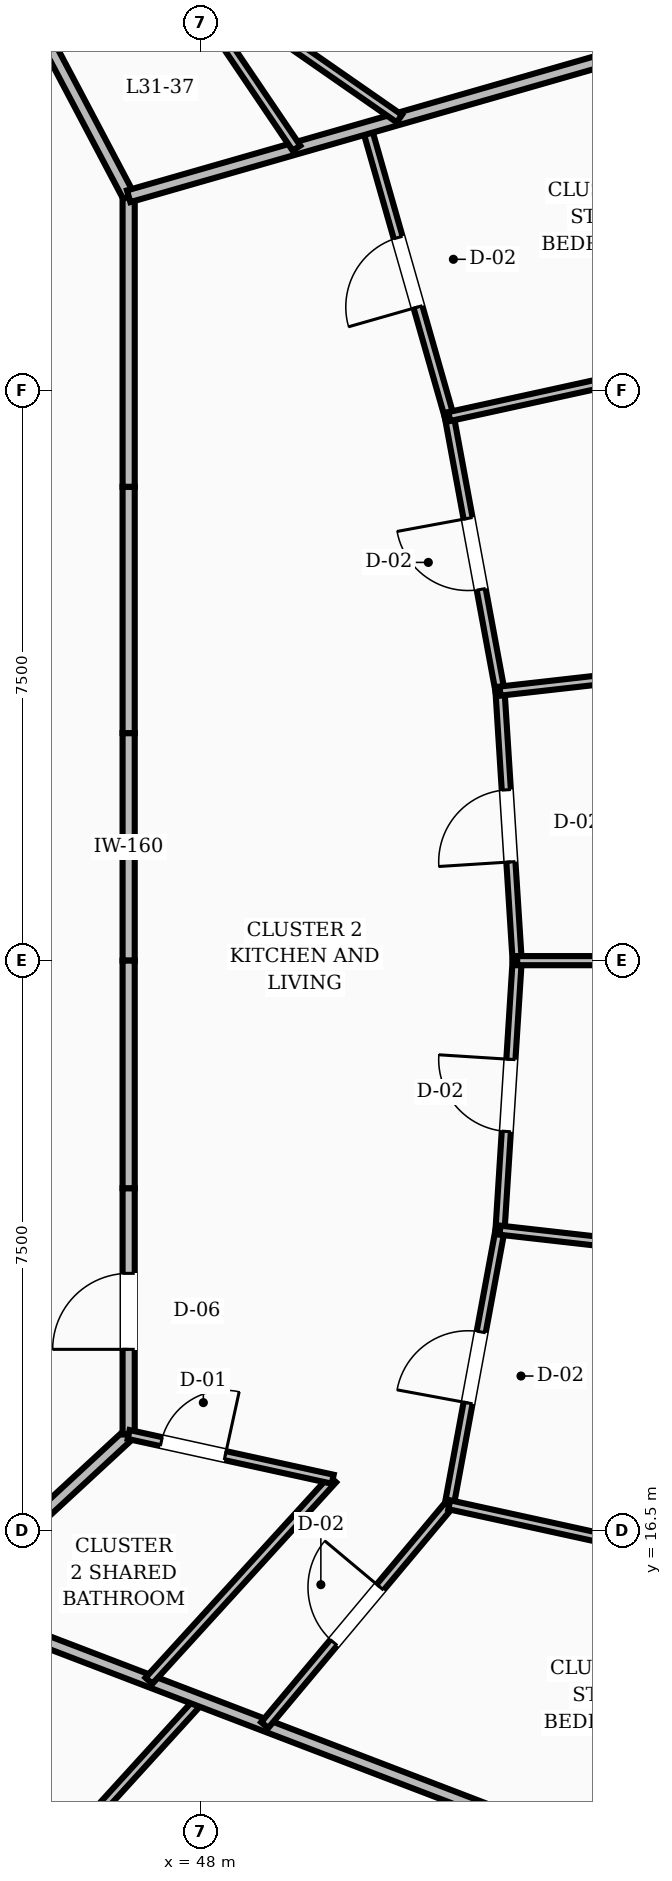
"""IFC4 building model, lengths in metres.
Left out: names, types, materials, properties, quantities, classifications, styles, units other than length and angle.
Written with IfcOpenShell. Run it as: python <this file> out.ifc"""

import sys

from ifc_helpers import new_model, si_unit, direction, frame, frame_2d, origin, place, context, subcontext, project, spatial, rectangle, extrude, element, fill, save


model = new_model("IFC4")
c1 = context("Model", 3, precision=1e-05, world=origin(), true_north=direction((0.0, 1.0)))
c2 = subcontext(c1, "Body", "Model", "MODEL_VIEW")
j1 = project(units=[si_unit("LENGTHUNIT", "METRE"), si_unit("PLANEANGLEUNIT", "RADIAN")], contexts=[c1])
p1 = place(None, origin())
s1 = spatial("IfcSite", under=j1, at=p1, CompositionType="ELEMENT")
p2 = place(p1, origin())
s2 = spatial("IfcBuilding", under=s1, at=p2, CompositionType="ELEMENT")
p3 = place(p2, frame((0.0, 0.0, 124.4)))
s3 = spatial("IfcBuildingStorey", under=s2, at=p3, CompositionType="ELEMENT", Elevation=124.4)
p4 = place(p3, frame((47.05, 24.0, 0.0), z_axis=(0.0, 0.0, 1.0), x_axis=(0.0, 1.0, 0.0)))
e1 = element("IfcWall", 1, at=p4, inside=s3, PredefinedType="SOLIDWALL", context=c2, shape_type="SweptSolid", body=[
    extrude(rectangle(XDim=2.994, YDim=0.16, at=frame_2d((1.497, 0.0))), origin(), (0.0, 0.0, 1.0), 2.8),
])
p5 = place(p3, frame((47.05, 26.994, 0.0), z_axis=(0.0, 0.0, 1.0), x_axis=(0.0, 1.0, 0.0)))
e2 = element("IfcWall", 2, at=p5, inside=s3, PredefinedType="SOLIDWALL", context=c2, shape_type="SweptSolid", body=[
    extrude(rectangle(XDim=3.24, YDim=0.16, at=frame_2d((1.62, 0.0))), origin(), (0.0, 0.0, 1.0), 2.8),
])
p6 = place(p3, frame((47.05, 30.234, 0.0), z_axis=(0.0, 0.0, 1.0), x_axis=(0.0, 1.0, 0.0)))
e3 = element("IfcWall", 3, at=p6, inside=s3, PredefinedType="SOLIDWALL", context=c2, shape_type="SweptSolid", body=[
    extrude(rectangle(XDim=3.822, YDim=0.16, at=frame_2d((1.911, 0.0))), origin(), (0.0, 0.0, 1.0), 2.8),
])
p7 = place(p3, frame((47.05, 34.056, 0.0), z_axis=(0.0, 0.0, 1.0), x_axis=(-0.466737093093, 0.884396113702, 0.0)))
e4 = element("IfcWall", 4, at=p7, inside=s3, PredefinedType="SOLIDWALL", context=c2, shape_type="SweptSolid", body=[
    extrude(rectangle(XDim=3.696, YDim=0.16, at=frame_2d((1.848, 0.0))), origin(), (0.0, 0.0, 1.0), 2.8),
])
p8 = place(p3, frame((44.65, 15.548, 0.0), z_axis=(0.0, 0.0, 1.0), x_axis=(0.734347936521, 0.678773237633, 0.0)))
e5 = element("IfcWall", 5, at=p8, inside=s3, PredefinedType="SOLIDWALL", context=c2, shape_type="SweptSolid", body=[
    extrude(rectangle(XDim=3.268, YDim=0.16, at=frame_2d((1.634, 0.0))), origin(), (0.0, 0.0, 1.0), 2.8),
])
p9 = place(p3, frame((47.05, 17.766, 0.0), z_axis=(0.0, 0.0, 1.0), x_axis=(0.0, 1.0, 0.0)))
e6 = element("IfcWall", 6, at=p9, inside=s3, PredefinedType="SOLIDWALL", context=c2, shape_type="SweptSolid", body=[
    extrude(rectangle(XDim=3.24, YDim=0.16, at=frame_2d((1.62, 0.0))), origin(), (0.0, 0.0, 1.0), 2.8),
])
p10 = place(p9, frame((1.12, 0.0, 0.0)))
e7 = element("IfcOpeningElement", 7, at=p10, cuts=e6, PredefinedType="OPENING", context=c2, shape_type="SweptSolid", body=[
    extrude(rectangle(XDim=1.0, YDim=2.1, at=frame_2d((0.5, 1.05))), frame((0.0, 0.09, 0.0), z_axis=(0.0, -1.0, 0.0), x_axis=(1.0, 0.0, 0.0)), (0.0, 0.0, 1.0), 0.18),
])
p11 = place(p3, frame((47.05, 21.006, 0.0), z_axis=(0.0, 0.0, 1.0), x_axis=(0.0, 1.0, 0.0)))
e8 = element("IfcWall", 8, at=p11, inside=s3, PredefinedType="SOLIDWALL", context=c2, shape_type="SweptSolid", body=[
    extrude(rectangle(XDim=2.994, YDim=0.16, at=frame_2d((1.497, 0.0))), origin(), (0.0, 0.0, 1.0), 2.8),
])
p12 = place(p3, frame((45.579, 11.631, 0.0), z_axis=(0.0, 0.0, 1.0), x_axis=(0.673346353961, 0.739327185762, 0.0)))
e9 = element("IfcWall", 9, at=p12, inside=s3, PredefinedType="PARTITIONING", context=c2, shape_type="SweptSolid", body=[
    extrude(rectangle(XDim=3.571, YDim=0.12, at=frame_2d((1.785, 0.0))), origin(), (0.0, 0.0, 1.0), 2.8),
])
p13 = place(p3, frame((44.65, 15.548, 0.0), z_axis=(0.0, 0.0, 1.0), x_axis=(0.933853161124, -0.35765664185, 0.0)))
e10 = element("IfcWall", 10, at=p13, inside=s3, PredefinedType="SOLIDWALL", context=c2, shape_type="SweptSolid", body=[
    extrude(rectangle(XDim=10.147, YDim=0.16, at=frame_2d((5.073, 0.0))), origin(), (0.0, 0.0, 1.0), 2.8),
])
p14 = place(p3, frame((47.316, 14.526, 0.0), z_axis=(0.0, 0.0, 1.0), x_axis=(0.673803025367, 0.738911011562, 0.0)))
e11 = element("IfcWall", 11, at=p14, inside=s3, PredefinedType="PARTITIONING", context=c2, shape_type="SweptSolid", body=[
    extrude(rectangle(XDim=3.589, YDim=0.12, at=frame_2d((1.794, 0.0))), origin(), (0.0, 0.0, 1.0), 2.8),
])
p15 = place(p3, frame((47.05, 17.766, 0.0), z_axis=(0.0, 0.0, 1.0), x_axis=(0.976828673368, -0.214022762541, 0.0)))
e12 = element("IfcWall", 12, at=p15, inside=s3, PredefinedType="PARTITIONING", context=c2, shape_type="SweptSolid", body=[
    extrude(rectangle(XDim=2.748, YDim=0.12, at=frame_2d((1.374, 0.0))), origin(), (0.0, 0.0, 1.0), 2.8),
])
p16 = place(p15, frame((0.44, 0.0, 0.0)))
e13 = element("IfcOpeningElement", 13, at=p16, cuts=e12, PredefinedType="OPENING", context=c2, shape_type="SweptSolid", body=[
    extrude(rectangle(XDim=0.86, YDim=2.1, at=frame_2d((0.43, 1.05))), frame((0.0, 0.07, 0.0), z_axis=(0.0, -1.0, 0.0), x_axis=(1.0, 0.0, 0.0)), (0.0, 0.0, 1.0), 0.14),
])
p17 = place(p3, frame((48.84, 13.943, 0.0), z_axis=(0.0, 0.0, 1.0), x_axis=(0.64212553746, 0.766599500483, 0.0)))
e14 = element("IfcWall", 14, at=p17, inside=s3, PredefinedType="PARTITIONING", context=c2, shape_type="SweptSolid", body=[
    extrude(rectangle(XDim=3.781, YDim=0.12, at=frame_2d((1.891, 0.0))), origin(), (0.0, 0.0, 1.0), 2.8),
])
p18 = place(p17, frame((1.416, 0.0, 0.0)))
e15 = element("IfcOpeningElement", 15, at=p18, cuts=e14, PredefinedType="OPENING", context=c2, shape_type="SweptSolid", body=[
    extrude(rectangle(XDim=0.95, YDim=2.1, at=frame_2d((0.475, 1.05))), frame((0.0, 0.07, 0.0), z_axis=(0.0, -1.0, 0.0), x_axis=(1.0, 0.0, 0.0)), (0.0, 0.0, 1.0), 0.14),
])
p19 = place(p3, frame((51.268, 16.842, 0.0), z_axis=(0.0, 0.0, 1.0), x_axis=(0.181767968599, 0.983341449137, 0.0)))
e16 = element("IfcWall", 16, at=p19, inside=s3, PredefinedType="PARTITIONING", context=c2, shape_type="SweptSolid", body=[
    extrude(rectangle(XDim=3.674, YDim=0.12, at=frame_2d((1.837, 0.0))), origin(), (0.0, 0.0, 1.0), 2.8),
])
p20 = place(p19, frame((1.362, 0.0, 0.0)))
e17 = element("IfcOpeningElement", 17, at=p20, cuts=e16, PredefinedType="OPENING", context=c2, shape_type="SweptSolid", body=[
    extrude(rectangle(XDim=0.95, YDim=2.1, at=frame_2d((0.475, 1.05))), frame((0.0, 0.07, 0.0), z_axis=(0.0, -1.0, 0.0), x_axis=(1.0, 0.0, 0.0)), (0.0, 0.0, 1.0), 0.14),
])
p21 = place(p3, frame((51.268, 16.842, 0.0), z_axis=(0.0, 0.0, 1.0), x_axis=(0.976839732101, -0.213972282759, 0.0)))
e18 = element("IfcWall", 18, at=p21, inside=s3, PredefinedType="PARTITIONING", context=c2, shape_type="SweptSolid", body=[
    extrude(rectangle(XDim=5.446, YDim=0.12, at=frame_2d((2.723, 0.0))), origin(), (0.0, 0.0, 1.0), 2.8),
])
p22 = place(p3, frame((51.936, 20.454, 0.0), z_axis=(0.0, 0.0, 1.0), x_axis=(0.063490483218, 0.997982444004, 0.0)))
e19 = element("IfcWall", 19, at=p22, inside=s3, PredefinedType="PARTITIONING", context=c2, shape_type="SweptSolid", body=[
    extrude(rectangle(XDim=3.553, YDim=0.12, at=frame_2d((1.776, 0.0))), origin(), (0.0, 0.0, 1.0), 2.8),
])
p23 = place(p22, frame((1.302, 0.0, 0.0)))
e20 = element("IfcOpeningElement", 20, at=p23, cuts=e19, PredefinedType="OPENING", context=c2, shape_type="SweptSolid", body=[
    extrude(rectangle(XDim=0.95, YDim=2.1, at=frame_2d((0.475, 1.05))), frame((0.0, 0.07, 0.0), z_axis=(0.0, -1.0, 0.0), x_axis=(1.0, 0.0, 0.0)), (0.0, 0.0, 1.0), 0.14),
])
p24 = place(p3, frame((51.936, 20.454, 0.0), z_axis=(0.0, 0.0, 1.0), x_axis=(0.993672361239, -0.112317578806, 0.0)))
e21 = element("IfcWall", 21, at=p24, inside=s3, PredefinedType="PARTITIONING", context=c2, shape_type="SweptSolid", body=[
    extrude(rectangle(XDim=6.208, YDim=0.12, at=frame_2d((3.104, 0.0))), origin(), (0.0, 0.0, 1.0), 2.8),
])
p25 = place(p3, frame((52.161, 24.0, 0.0), z_axis=(0.0, 0.0, 1.0), x_axis=(-0.063490483218, 0.997982444004, 0.0)))
e22 = element("IfcWall", 22, at=p25, inside=s3, PredefinedType="PARTITIONING", context=c2, shape_type="SweptSolid", body=[
    extrude(rectangle(XDim=3.553, YDim=0.12, at=frame_2d((1.776, 0.0))), origin(), (0.0, 0.0, 1.0), 2.8),
])
p26 = place(p25, frame((1.302, 0.0, 0.0)))
e23 = element("IfcOpeningElement", 23, at=p26, cuts=e22, PredefinedType="OPENING", context=c2, shape_type="SweptSolid", body=[
    extrude(rectangle(XDim=0.95, YDim=2.1, at=frame_2d((0.475, 1.05))), frame((0.0, 0.07, 0.0), z_axis=(0.0, -1.0, 0.0), x_axis=(1.0, 0.0, 0.0)), (0.0, 0.0, 1.0), 0.14),
])
p27 = place(p3, frame((52.161, 24.0, 0.0), z_axis=(0.0, 0.0, 1.0), x_axis=(1.0, 0.0, 0.0)))
e24 = element("IfcWall", 24, at=p27, inside=s3, PredefinedType="PARTITIONING", context=c2, shape_type="SweptSolid", body=[
    extrude(rectangle(XDim=6.455, YDim=0.12, at=frame_2d((3.228, 0.0))), origin(), (0.0, 0.0, 1.0), 2.8),
])
p28 = place(p3, frame((51.936, 27.546, 0.0), z_axis=(0.0, 0.0, 1.0), x_axis=(-0.181767968599, 0.983341449137, 0.0)))
e25 = element("IfcWall", 25, at=p28, inside=s3, PredefinedType="PARTITIONING", context=c2, shape_type="SweptSolid", body=[
    extrude(rectangle(XDim=3.674, YDim=0.12, at=frame_2d((1.837, 0.0))), origin(), (0.0, 0.0, 1.0), 2.8),
])
p29 = place(p28, frame((1.362, 0.0, 0.0)))
e26 = element("IfcOpeningElement", 26, at=p29, cuts=e25, PredefinedType="OPENING", context=c2, shape_type="SweptSolid", body=[
    extrude(rectangle(XDim=0.95, YDim=2.1, at=frame_2d((0.475, 1.05))), frame((0.0, 0.07, 0.0), z_axis=(0.0, -1.0, 0.0), x_axis=(1.0, 0.0, 0.0)), (0.0, 0.0, 1.0), 0.14),
])
p30 = place(p3, frame((51.936, 27.546, 0.0), z_axis=(0.0, 0.0, 1.0), x_axis=(0.993672361239, 0.112317578806, 0.0)))
e27 = element("IfcWall", 27, at=p30, inside=s3, PredefinedType="PARTITIONING", context=c2, shape_type="SweptSolid", body=[
    extrude(rectangle(XDim=6.208, YDim=0.12, at=frame_2d((3.104, 0.0))), origin(), (0.0, 0.0, 1.0), 2.8),
])
p31 = place(p3, frame((51.268, 31.158, 0.0), z_axis=(0.0, 0.0, 1.0), x_axis=(-0.274582301576, 0.961563601465, 0.0)))
e28 = element("IfcWall", 28, at=p31, inside=s3, PredefinedType="PARTITIONING", context=c2, shape_type="SweptSolid", body=[
    extrude(rectangle(XDim=3.949, YDim=0.12, at=frame_2d((1.974, 0.0))), origin(), (0.0, 0.0, 1.0), 2.8),
])
p32 = place(p31, frame((1.5, 0.0, 0.0)))
e29 = element("IfcOpeningElement", 29, at=p32, cuts=e28, PredefinedType="OPENING", context=c2, shape_type="SweptSolid", body=[
    extrude(rectangle(XDim=0.95, YDim=2.1, at=frame_2d((0.475, 1.05))), frame((0.0, 0.07, 0.0), z_axis=(0.0, -1.0, 0.0), x_axis=(1.0, 0.0, 0.0)), (0.0, 0.0, 1.0), 0.14),
])
p33 = place(p3, frame((51.268, 31.158, 0.0), z_axis=(0.0, 0.0, 1.0), x_axis=(0.976839732101, 0.213972282759, 0.0)))
e30 = element("IfcWall", 30, at=p33, inside=s3, PredefinedType="PARTITIONING", context=c2, shape_type="SweptSolid", body=[
    extrude(rectangle(XDim=5.446, YDim=0.12, at=frame_2d((2.723, 0.0))), origin(), (0.0, 0.0, 1.0), 2.8),
])
p34 = place(p3, frame((47.05, 34.056, 0.0), z_axis=(0.0, 0.0, 1.0), x_axis=(0.96122671613, 0.275759315705, 0.0)))
e31 = element("IfcWall", 31, at=p34, inside=s3, PredefinedType="SOLIDWALL", context=c2, shape_type="SweptSolid", body=[
    extrude(rectangle(XDim=7.36, YDim=0.16, at=frame_2d((3.68, 0.0))), origin(), (0.0, 0.0, 1.0), 2.8),
])
p35 = place(p3, frame((49.258, 34.69, 0.0), z_axis=(0.0, 0.0, 1.0), x_axis=(-0.560422606551, 0.828206799095, 0.0)))
e32 = element("IfcWall", 32, at=p35, inside=s3, PredefinedType="PARTITIONING", context=c2, shape_type="SweptSolid", body=[
    extrude(rectangle(XDim=3.959, YDim=0.12, at=frame_2d((1.979, 0.0))), origin(), (0.0, 0.0, 1.0), 2.8),
])
p36 = place(p3, frame((50.611, 35.078, 0.0), z_axis=(0.0, 0.0, 1.0), x_axis=(-0.821081312211, 0.570811246156, 0.0)))
e33 = element("IfcWall", 33, at=p36, inside=s3, PredefinedType="PARTITIONING", context=c2, shape_type="SweptSolid", body=[
    extrude(rectangle(XDim=8.192, YDim=0.12, at=frame_2d((4.096, 0.0))), origin(), (0.0, 0.0, 1.0), 2.8),
])
p37 = place(p36, frame((5.021, 0.0, 0.0)))
e34 = element("IfcOpeningElement", 34, at=p37, cuts=e33, PredefinedType="OPENING", context=c2, shape_type="SweptSolid", body=[
    extrude(rectangle(XDim=0.95, YDim=2.1, at=frame_2d((0.475, 1.05))), frame((0.0, 0.07, 0.0), z_axis=(0.0, -1.0, 0.0), x_axis=(1.0, 0.0, 0.0)), (0.0, 0.0, 1.0), 0.14),
])
p38 = place(p16, origin())
e35 = element("IfcDoor", 35, at=p38, inside=s3, OperationType="SINGLE_SWING_RIGHT", PredefinedType="DOOR", context=c2, shape_type="SweptSolid", body=[
    extrude(rectangle(XDim=0.86, YDim=2.1, at=frame_2d((0.43, 1.05))), frame((0.0, 0.025, 0.0), z_axis=(0.0, -1.0, 0.0), x_axis=(1.0, 0.0, 0.0)), (0.0, 0.0, 1.0), 0.05),
])
fill(e13, e35)
p39 = place(p10, origin())
e36 = element("IfcDoor", 36, at=p39, inside=s3, OperationType="SINGLE_SWING_LEFT", PredefinedType="DOOR", context=c2, shape_type="SweptSolid", body=[
    extrude(rectangle(XDim=1.0, YDim=2.1, at=frame_2d((0.5, 1.05))), frame((0.0, 0.025, 0.0), z_axis=(0.0, -1.0, 0.0), x_axis=(1.0, 0.0, 0.0)), (0.0, 0.0, 1.0), 0.05),
])
fill(e7, e36)
p40 = place(p18, origin())
e37 = element("IfcDoor", 37, at=p40, inside=s3, OperationType="SINGLE_SWING_RIGHT", PredefinedType="DOOR", context=c2, shape_type="SweptSolid", body=[
    extrude(rectangle(XDim=0.95, YDim=2.1, at=frame_2d((0.475, 1.05))), frame((0.0, 0.025, 0.0), z_axis=(0.0, -1.0, 0.0), x_axis=(1.0, 0.0, 0.0)), (0.0, 0.0, 1.0), 0.05),
])
fill(e15, e37)
p41 = place(p20, origin())
e38 = element("IfcDoor", 38, at=p41, inside=s3, OperationType="SINGLE_SWING_LEFT", PredefinedType="DOOR", context=c2, shape_type="SweptSolid", body=[
    extrude(rectangle(XDim=0.95, YDim=2.1, at=frame_2d((0.475, 1.05))), frame((0.0, 0.025, 0.0), z_axis=(0.0, -1.0, 0.0), x_axis=(1.0, 0.0, 0.0)), (0.0, 0.0, 1.0), 0.05),
])
fill(e17, e38)
p42 = place(p23, origin())
e39 = element("IfcDoor", 39, at=p42, inside=s3, OperationType="SINGLE_SWING_RIGHT", PredefinedType="DOOR", context=c2, shape_type="SweptSolid", body=[
    extrude(rectangle(XDim=0.95, YDim=2.1, at=frame_2d((0.475, 1.05))), frame((0.0, 0.025, 0.0), z_axis=(0.0, -1.0, 0.0), x_axis=(1.0, 0.0, 0.0)), (0.0, 0.0, 1.0), 0.05),
])
fill(e20, e39)
p43 = place(p26, origin())
e40 = element("IfcDoor", 40, at=p43, inside=s3, OperationType="SINGLE_SWING_LEFT", PredefinedType="DOOR", context=c2, shape_type="SweptSolid", body=[
    extrude(rectangle(XDim=0.95, YDim=2.1, at=frame_2d((0.475, 1.05))), frame((0.0, 0.025, 0.0), z_axis=(0.0, -1.0, 0.0), x_axis=(1.0, 0.0, 0.0)), (0.0, 0.0, 1.0), 0.05),
])
fill(e23, e40)
p44 = place(p29, origin())
e41 = element("IfcDoor", 41, at=p44, inside=s3, OperationType="SINGLE_SWING_RIGHT", PredefinedType="DOOR", context=c2, shape_type="SweptSolid", body=[
    extrude(rectangle(XDim=0.95, YDim=2.1, at=frame_2d((0.475, 1.05))), frame((0.0, 0.025, 0.0), z_axis=(0.0, -1.0, 0.0), x_axis=(1.0, 0.0, 0.0)), (0.0, 0.0, 1.0), 0.05),
])
fill(e26, e41)
p45 = place(p32, origin())
e42 = element("IfcDoor", 42, at=p45, inside=s3, OperationType="SINGLE_SWING_LEFT", PredefinedType="DOOR", context=c2, shape_type="SweptSolid", body=[
    extrude(rectangle(XDim=0.95, YDim=2.1, at=frame_2d((0.475, 1.05))), frame((0.0, 0.025, 0.0), z_axis=(0.0, -1.0, 0.0), x_axis=(1.0, 0.0, 0.0)), (0.0, 0.0, 1.0), 0.05),
])
fill(e29, e42)
save(model, sys.argv[1])
